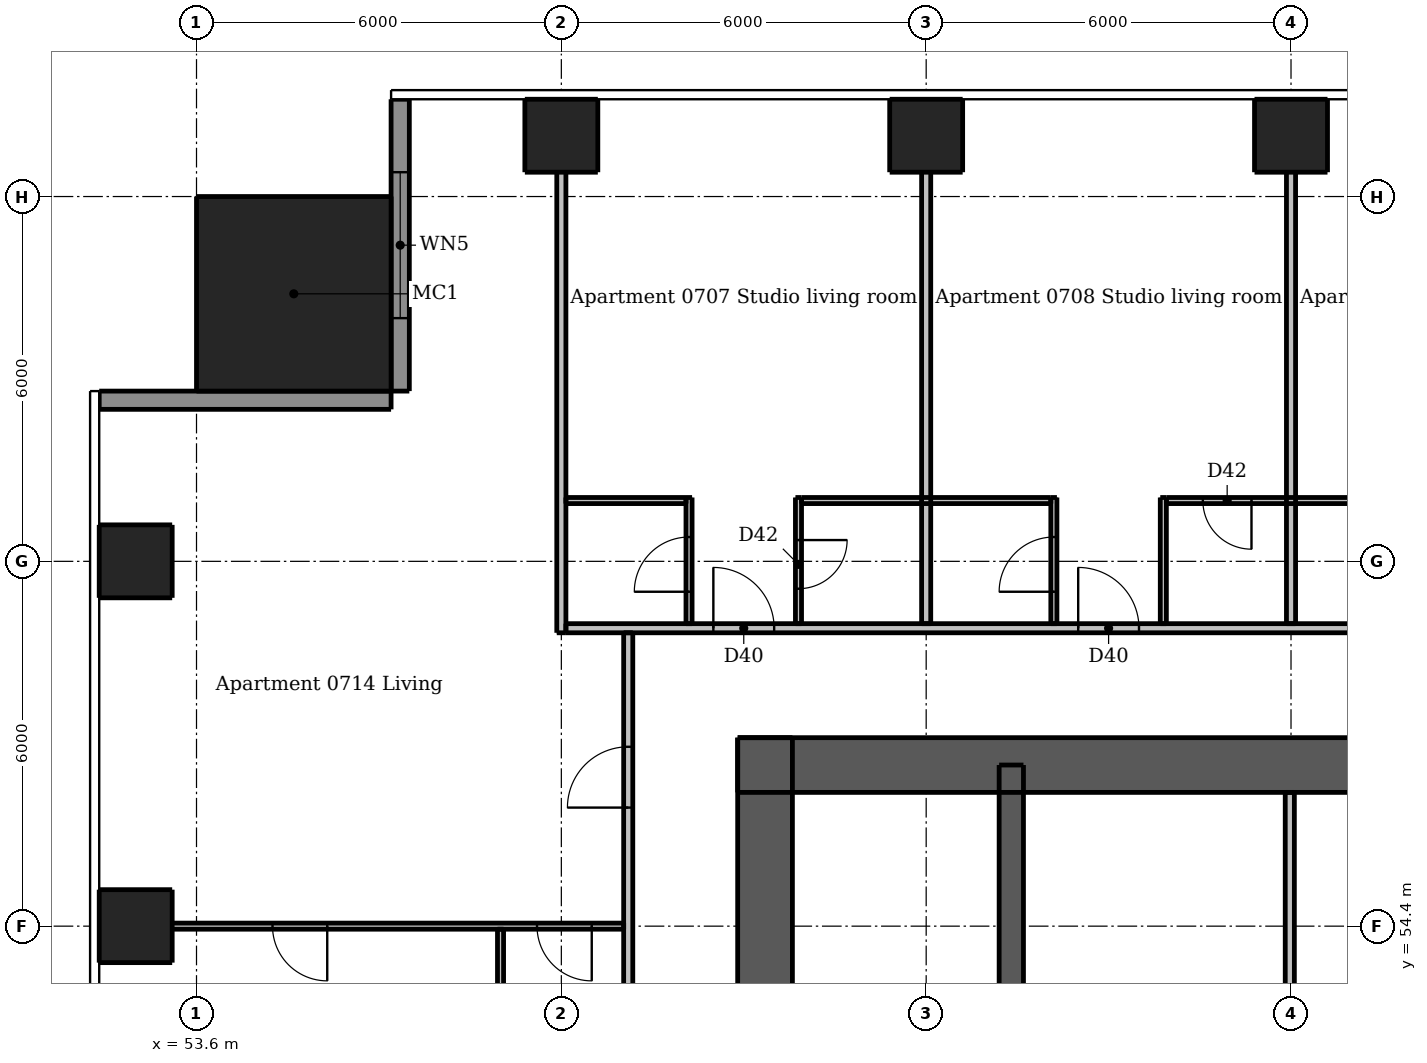
"""IFC4 building model, lengths in metres.
Left out: names, types, materials, properties, quantities, classifications, styles, units other than length and angle.
Written with IfcOpenShell. Run it as: python <this file> out.ifc"""

import sys

from ifc_helpers import new_model, si_unit, direction, frame, frame_2d, origin, origin_2d, place, context, subcontext, project, spatial, rectangle, extrude, element, fill, save


model = new_model("IFC4")
c1 = context("Model", 3, precision=1e-05, world=origin(), true_north=direction((0.0, 1.0)))
c2 = subcontext(c1, "Body", "Model", "MODEL_VIEW")
j1 = project(units=[si_unit("LENGTHUNIT", "METRE"), si_unit("PLANEANGLEUNIT", "RADIAN")], contexts=[c1])
p1 = place(None, origin())
s1 = spatial("IfcSite", under=j1, at=p1, CompositionType="ELEMENT")
p2 = place(p1, origin())
s2 = spatial("IfcBuilding", under=s1, at=p2, CompositionType="ELEMENT")
p3 = place(p2, frame((0.0, 0.0, 30.1)))
s3 = spatial("IfcBuildingStorey", under=s2, at=p3, CompositionType="ELEMENT", Elevation=30.1)
p4 = place(p3, frame((62.5, 57.05, 0.0), z_axis=(0.0, 0.0, 1.0), x_axis=(1.0, 0.0, 0.0)))
e1 = element("IfcWall", 1, at=p4, inside=s3, PredefinedType="SHEAR", context=c2, shape_type="SweptSolid", body=[
    extrude(rectangle(XDim=24.0, YDim=0.9, at=frame_2d((12.0, 0.0))), origin(), (0.0, 0.0, 1.0), 3.05),
])
p5 = place(p4, frame((20.85, 0.0, 0.0)))
e2 = element("IfcOpeningElement", 2, at=p5, cuts=e1, PredefinedType="OPENING", context=c2, shape_type="SweptSolid", body=[
    extrude(rectangle(XDim=1.1, YDim=2.1, at=frame_2d((0.55, 1.05))), frame((0.0, 0.46, 0.0), z_axis=(0.0, -1.0, 0.0), x_axis=(1.0, 0.0, 0.0)), (0.0, 0.0, 1.0), 0.92),
])
p6 = place(p4, frame((2.05, 0.0, 0.0)))
e3 = element("IfcOpeningElement", 3, at=p6, cuts=e1, PredefinedType="OPENING", context=c2, shape_type="SweptSolid", body=[
    extrude(rectangle(XDim=1.1, YDim=2.1, at=frame_2d((0.55, 1.05))), frame((0.0, 0.46, 0.0), z_axis=(0.0, -1.0, 0.0), x_axis=(1.0, 0.0, 0.0)), (0.0, 0.0, 1.0), 0.92),
])
p7 = place(p4, frame((6.44, 0.0, 0.0)))
e4 = element("IfcOpeningElement", 4, at=p7, cuts=e1, PredefinedType="OPENING", context=c2, shape_type="SweptSolid", body=[
    extrude(rectangle(XDim=0.9, YDim=2.1, at=frame_2d((0.45, 1.05))), frame((0.0, 0.46, 0.0), z_axis=(0.0, -1.0, 0.0), x_axis=(1.0, 0.0, 0.0)), (0.0, 0.0, 1.0), 0.92),
])
p8 = place(p4, frame((13.74, 0.0, 0.0)))
e5 = element("IfcOpeningElement", 5, at=p8, cuts=e1, PredefinedType="OPENING", context=c2, shape_type="SweptSolid", body=[
    extrude(rectangle(XDim=0.9, YDim=2.1, at=frame_2d((0.45, 1.05))), frame((0.0, 0.46, 0.0), z_axis=(0.0, -1.0, 0.0), x_axis=(1.0, 0.0, 0.0)), (0.0, 0.0, 1.0), 0.92),
])
p9 = place(p3, frame((62.95, 33.5, 0.0), z_axis=(0.0, 0.0, 1.0), x_axis=(0.0, 1.0, 0.0)))
e6 = element("IfcWall", 6, at=p9, inside=s3, PredefinedType="SHEAR", context=c2, shape_type="SweptSolid", body=[
    extrude(rectangle(XDim=24.0, YDim=0.9, at=frame_2d((12.0, 0.0))), origin(), (0.0, 0.0, 1.0), 3.05),
])
p10 = place(p9, frame((11.2, 0.0, 0.0)))
e7 = element("IfcOpeningElement", 7, at=p10, cuts=e6, PredefinedType="OPENING", context=c2, shape_type="SweptSolid", body=[
    extrude(rectangle(XDim=1.6, YDim=2.1, at=frame_2d((0.8, 1.05))), frame((0.0, 0.46, 0.0), z_axis=(0.0, -1.0, 0.0), x_axis=(1.0, 0.0, 0.0)), (0.0, 0.0, 1.0), 0.92),
])
p11 = place(p3, frame((67.0, 47.1, 0.0), z_axis=(0.0, 0.0, 1.0), x_axis=(0.0, 1.0, 0.0)))
e8 = element("IfcWall", 8, at=p11, inside=s3, PredefinedType="SHEAR", context=c2, shape_type="SweptSolid", body=[
    extrude(rectangle(XDim=9.95, YDim=0.4, at=frame_2d((4.975, 0.0))), origin(), (0.0, 0.0, 1.0), 3.05),
])
for number, where, z_axis, x_axis in (
    (9, (59.6, 67.4, 0.0), (0.0, 0.0, 1.0), (1.0, 0.0, 0.0)),
    (10, (65.6, 67.4, 0.0), (0.0, 0.0, 1.0), (1.0, 0.0, 0.0)),
    (11, (71.6, 67.4, 0.0), (0.0, 0.0, 1.0), (1.0, 0.0, 0.0)),
    (12, (52.6, 54.4, 0.0), (0.0, 0.0, 1.0), (1.0, 0.0, 0.0)),
    (13, (52.6, 60.4, 0.0), (0.0, 0.0, 1.0), (1.0, 0.0, 0.0)),
):
    element("IfcColumn", number, at=place(p3, frame(where, z_axis=z_axis, x_axis=x_axis)), inside=s3, PredefinedType="COLUMN", context=c2, shape_type="SweptSolid", body=[
        extrude(rectangle(XDim=1.2, YDim=1.2, at=origin_2d()), origin(), (0.0, 0.0, 1.0), 3.05),
    ])
p12 = place(p3, frame((55.2, 64.8, 0.0), z_axis=(0.0, 0.0, 1.0), x_axis=(1.0, 0.0, 0.0)))
e14 = element("IfcColumn", 14, at=p12, inside=s3, PredefinedType="COLUMN", context=c2, shape_type="SweptSolid", body=[
    extrude(rectangle(XDim=3.2, YDim=3.2, at=origin_2d()), origin(), (0.0, 0.0, 1.0), 3.3),
])
p13 = place(p3, frame((56.95, 68.0, 0.0), z_axis=(0.0, 0.0, 1.0), x_axis=(0.0, -1.0, 0.0)))
e15 = element("IfcWall", 15, at=p13, inside=s3, PredefinedType="SOLIDWALL", context=c2, shape_type="SweptSolid", body=[
    extrude(rectangle(XDim=4.8, YDim=0.3, at=frame_2d((2.4, 0.0))), origin(), (0.0, 0.0, 1.0), 3.05),
])
p14 = place(p13, frame((1.2, 0.0, 0.15)))
e16 = element("IfcOpeningElement", 16, at=p14, cuts=e15, PredefinedType="OPENING", context=c2, shape_type="SweptSolid", body=[
    extrude(rectangle(XDim=2.4, YDim=2.1, at=frame_2d((1.2, 1.05))), frame((0.0, 0.16, 0.0), z_axis=(0.0, -1.0, 0.0), x_axis=(1.0, 0.0, 0.0)), (0.0, 0.0, 1.0), 0.32),
])
p15 = place(p3, frame((56.8, 63.05, 0.0), z_axis=(0.0, 0.0, 1.0), x_axis=(-1.0, 0.0, 0.0)))
e17 = element("IfcWall", 17, at=p15, inside=s3, PredefinedType="SOLIDWALL", context=c2, shape_type="SweptSolid", body=[
    extrude(rectangle(XDim=4.8, YDim=0.3, at=frame_2d((2.4, 0.0))), origin(), (0.0, 0.0, 1.0), 3.05),
])
p16 = place(p3, frame((71.58, 50.2, 0.0), z_axis=(0.0, 0.0, 1.0), x_axis=(0.0, 1.0, 0.0)))
e18 = element("IfcWall", 18, at=p16, inside=s3, PredefinedType="PLUMBINGWALL", context=c2, shape_type="SweptSolid", body=[
    extrude(rectangle(XDim=6.4, YDim=0.15, at=frame_2d((3.2, 0.0))), origin(), (0.0, 0.0, 1.0), 3.05),
])
p17 = place(p3, frame((58.6, 54.35, 0.0), z_axis=(0.0, 0.0, 1.0), x_axis=(0.0, -1.0, 0.0)))
e19 = element("IfcWall", 19, at=p17, inside=s3, PredefinedType="PARTITIONING", context=c2, shape_type="SweptSolid", body=[
    extrude(rectangle(XDim=8.1, YDim=0.1, at=frame_2d((4.05, 0.0))), origin(), (0.0, 0.0, 1.0), 3.05),
])
p18 = place(p17, frame((3.75, 0.0, 0.0)))
e20 = element("IfcOpeningElement", 20, at=p18, cuts=e19, PredefinedType="OPENING", context=c2, shape_type="SweptSolid", body=[
    extrude(rectangle(XDim=0.8, YDim=2.1, at=frame_2d((0.4, 1.05))), frame((0.0, 0.06, 0.0), z_axis=(0.0, -1.0, 0.0), x_axis=(1.0, 0.0, 0.0)), (0.0, 0.0, 1.0), 0.12),
])
p19 = place(p3, frame((61.7, 59.375, 0.0), z_axis=(0.0, 0.0, 1.0), x_axis=(0.0, 1.0, 0.0)))
e21 = element("IfcWall", 21, at=p19, inside=s3, PredefinedType="PARTITIONING", context=c2, shape_type="SweptSolid", body=[
    extrude(rectangle(XDim=2.075, YDim=0.1, at=frame_2d((1.038, 0.0))), origin(), (0.0, 0.0, 1.0), 3.05),
])
p20 = place(p19, frame((0.525, 0.0, 0.0)))
e22 = element("IfcOpeningElement", 22, at=p20, cuts=e21, PredefinedType="OPENING", context=c2, shape_type="SweptSolid", body=[
    extrude(rectangle(XDim=0.9, YDim=2.1, at=frame_2d((0.45, 1.05))), frame((0.0, 0.06, 0.0), z_axis=(0.0, -1.0, 0.0), x_axis=(1.0, 0.0, 0.0)), (0.0, 0.0, 1.0), 0.12),
])
p21 = place(p3, frame((63.5, 61.45, 0.0), z_axis=(0.0, 0.0, 1.0), x_axis=(0.0, -1.0, 0.0)))
e23 = element("IfcWall", 23, at=p21, inside=s3, PredefinedType="PARTITIONING", context=c2, shape_type="SweptSolid", body=[
    extrude(rectangle(XDim=2.075, YDim=0.1, at=frame_2d((1.038, 0.0))), origin(), (0.0, 0.0, 1.0), 3.05),
])
p22 = place(p21, frame((0.7, 0.0, 0.0)))
e24 = element("IfcOpeningElement", 24, at=p22, cuts=e23, PredefinedType="OPENING", context=c2, shape_type="SweptSolid", body=[
    extrude(rectangle(XDim=0.8, YDim=2.1, at=frame_2d((0.4, 1.05))), frame((0.0, 0.06, 0.0), z_axis=(0.0, -1.0, 0.0), x_axis=(1.0, 0.0, 0.0)), (0.0, 0.0, 1.0), 0.12),
])
p23 = place(p3, frame((67.7, 59.375, 0.0), z_axis=(0.0, 0.0, 1.0), x_axis=(0.0, 1.0, 0.0)))
e25 = element("IfcWall", 25, at=p23, inside=s3, PredefinedType="PARTITIONING", context=c2, shape_type="SweptSolid", body=[
    extrude(rectangle(XDim=2.075, YDim=0.1, at=frame_2d((1.038, 0.0))), origin(), (0.0, 0.0, 1.0), 3.05),
])
p24 = place(p23, frame((0.525, 0.0, 0.0)))
e26 = element("IfcOpeningElement", 26, at=p24, cuts=e25, PredefinedType="OPENING", context=c2, shape_type="SweptSolid", body=[
    extrude(rectangle(XDim=0.9, YDim=2.1, at=frame_2d((0.45, 1.05))), frame((0.0, 0.06, 0.0), z_axis=(0.0, -1.0, 0.0), x_axis=(1.0, 0.0, 0.0)), (0.0, 0.0, 1.0), 0.12),
])
p25 = place(p3, frame((69.5, 59.375, 0.0), z_axis=(0.0, 0.0, 1.0), x_axis=(0.0, 1.0, 0.0)))
e27 = element("IfcWall", 27, at=p25, inside=s3, PredefinedType="PARTITIONING", context=c2, shape_type="SweptSolid", body=[
    extrude(rectangle(XDim=2.075, YDim=0.1, at=frame_2d((1.038, 0.0))), origin(), (0.0, 0.0, 1.0), 3.05),
])
p26 = place(p3, frame((59.675, 61.4, 0.0), z_axis=(0.0, 0.0, 1.0), x_axis=(1.0, 0.0, 0.0)))
e28 = element("IfcWall", 28, at=p26, inside=s3, PredefinedType="PARTITIONING", context=c2, shape_type="SweptSolid", body=[
    extrude(rectangle(XDim=1.975, YDim=0.1, at=frame_2d((0.987, 0.0))), origin(), (0.0, 0.0, 1.0), 3.05),
])
p27 = place(p3, frame((63.55, 61.4, 0.0), z_axis=(0.0, 0.0, 1.0), x_axis=(1.0, 0.0, 0.0)))
e29 = element("IfcWall", 29, at=p27, inside=s3, PredefinedType="PARTITIONING", context=c2, shape_type="SweptSolid", body=[
    extrude(rectangle(XDim=4.1, YDim=0.1, at=frame_2d((2.05, 0.0))), origin(), (0.0, 0.0, 1.0), 3.05),
])
p28 = place(p3, frame((73.65, 61.4, 0.0), z_axis=(0.0, 0.0, 1.0), x_axis=(-1.0, 0.0, 0.0)))
e30 = element("IfcWall", 30, at=p28, inside=s3, PredefinedType="PARTITIONING", context=c2, shape_type="SweptSolid", body=[
    extrude(rectangle(XDim=4.1, YDim=0.1, at=frame_2d((2.05, 0.0))), origin(), (0.0, 0.0, 1.0), 3.05),
])
p29 = place(p28, frame((2.7, 0.0, 0.0)))
e31 = element("IfcOpeningElement", 31, at=p29, cuts=e30, PredefinedType="OPENING", context=c2, shape_type="SweptSolid", body=[
    extrude(rectangle(XDim=0.8, YDim=2.1, at=frame_2d((0.4, 1.05))), frame((0.0, 0.06, 0.0), z_axis=(0.0, -1.0, 0.0), x_axis=(1.0, 0.0, 0.0)), (0.0, 0.0, 1.0), 0.12),
])
p30 = place(p3, frame((60.625, 54.4, 0.0), z_axis=(0.0, 0.0, 1.0), x_axis=(-1.0, 0.0, 0.0)))
e32 = element("IfcWall", 32, at=p30, inside=s3, PredefinedType="PARTITIONING", context=c2, shape_type="SweptSolid", body=[
    extrude(rectangle(XDim=8.625, YDim=0.1, at=frame_2d((4.312, 0.0))), origin(), (0.0, 0.0, 1.0), 2.516),
])
p31 = place(p30, frame((0.525, 0.0, 0.0)))
e33 = element("IfcOpeningElement", 33, at=p31, cuts=e32, PredefinedType="OPENING", context=c2, shape_type="SweptSolid", body=[
    extrude(rectangle(XDim=0.9, YDim=2.1, at=frame_2d((0.45, 1.05))), frame((0.0, 0.06, 0.0), z_axis=(0.0, -1.0, 0.0), x_axis=(1.0, 0.0, 0.0)), (0.0, 0.0, 1.0), 0.12),
])
p32 = place(p30, frame((4.875, 0.0, 0.0)))
e34 = element("IfcOpeningElement", 34, at=p32, cuts=e32, PredefinedType="OPENING", context=c2, shape_type="SweptSolid", body=[
    extrude(rectangle(XDim=0.9, YDim=2.1, at=frame_2d((0.45, 1.05))), frame((0.0, 0.06, 0.0), z_axis=(0.0, -1.0, 0.0), x_axis=(1.0, 0.0, 0.0)), (0.0, 0.0, 1.0), 0.12),
])
p33 = place(p3, frame((59.6, 59.225, 0.0), z_axis=(0.0, 0.0, 1.0), x_axis=(0.0, 1.0, 0.0)))
e35 = element("IfcWall", 35, at=p33, inside=s3, PredefinedType="PARTITIONING", context=c2, shape_type="SweptSolid", body=[
    extrude(rectangle(XDim=8.775, YDim=0.15, at=frame_2d((4.387, 0.0))), origin(), (0.0, 0.0, 1.0), 2.51),
])
p34 = place(p3, frame((60.7, 30.325, 0.0), z_axis=(0.0, 0.0, 1.0), x_axis=(0.0, 1.0, 0.0)))
e36 = element("IfcWall", 36, at=p34, inside=s3, PredefinedType="PARTITIONING", context=c2, shape_type="SweptSolid", body=[
    extrude(rectangle(XDim=28.9, YDim=0.15, at=frame_2d((14.45, 0.0))), origin(), (0.0, 0.0, 1.0), 3.05),
])
p35 = place(p34, frame((2.575, 0.0, 0.0)))
e37 = element("IfcOpeningElement", 37, at=p35, cuts=e36, PredefinedType="OPENING", context=c2, shape_type="SweptSolid", body=[
    extrude(rectangle(XDim=1.0, YDim=2.1, at=frame_2d((0.5, 1.05))), frame((0.0, 0.085, 0.0), z_axis=(0.0, -1.0, 0.0), x_axis=(1.0, 0.0, 0.0)), (0.0, 0.0, 1.0), 0.17),
])
p36 = place(p34, frame((8.575, 0.0, 0.0)))
e38 = element("IfcOpeningElement", 38, at=p36, cuts=e36, PredefinedType="OPENING", context=c2, shape_type="SweptSolid", body=[
    extrude(rectangle(XDim=1.0, YDim=2.1, at=frame_2d((0.5, 1.05))), frame((0.0, 0.085, 0.0), z_axis=(0.0, -1.0, 0.0), x_axis=(1.0, 0.0, 0.0)), (0.0, 0.0, 1.0), 0.17),
])
p37 = place(p34, frame((14.575, 0.0, 0.0)))
e39 = element("IfcOpeningElement", 39, at=p37, cuts=e36, PredefinedType="OPENING", context=c2, shape_type="SweptSolid", body=[
    extrude(rectangle(XDim=1.0, YDim=2.1, at=frame_2d((0.5, 1.05))), frame((0.0, 0.085, 0.0), z_axis=(0.0, -1.0, 0.0), x_axis=(1.0, 0.0, 0.0)), (0.0, 0.0, 1.0), 0.17),
])
p38 = place(p34, frame((26.025, 0.0, 0.0)))
e40 = element("IfcOpeningElement", 40, at=p38, cuts=e36, PredefinedType="OPENING", context=c2, shape_type="SweptSolid", body=[
    extrude(rectangle(XDim=1.0, YDim=2.1, at=frame_2d((0.5, 1.05))), frame((0.0, 0.085, 0.0), z_axis=(0.0, -1.0, 0.0), x_axis=(1.0, 0.0, 0.0)), (0.0, 0.0, 1.0), 0.17),
])
for number, where, z_axis, x_axis in (
    (41, (65.6, 59.375, 0.0), (0.0, 0.0, 1.0), (0.0, 1.0, 0.0)),
    (42, (71.6, 59.375, 0.0), (0.0, 0.0, 1.0), (0.0, 1.0, 0.0)),
):
    element("IfcWall", number, at=place(p3, frame(where, z_axis=z_axis, x_axis=x_axis)), inside=s3, PredefinedType="PARTITIONING", context=c2, shape_type="SweptSolid", body=[
        extrude(rectangle(XDim=8.625, YDim=0.15, at=frame_2d((4.312, 0.0))), origin(), (0.0, 0.0, 1.0), 2.516),
    ])
p39 = place(p3, frame((59.675, 59.3, 0.0), z_axis=(0.0, 0.0, 1.0), x_axis=(1.0, 0.0, 0.0)))
e43 = element("IfcWall", 43, at=p39, inside=s3, PredefinedType="PARTITIONING", context=c2, shape_type="SweptSolid", body=[
    extrude(rectangle(XDim=28.55, YDim=0.15, at=frame_2d((14.275, 0.0))), origin(), (0.0, 0.0, 1.0), 3.05),
])
p40 = place(p39, frame((2.425, 0.0, 0.0)))
e44 = element("IfcOpeningElement", 44, at=p40, cuts=e43, PredefinedType="OPENING", context=c2, shape_type="SweptSolid", body=[
    extrude(rectangle(XDim=1.0, YDim=2.1, at=frame_2d((0.5, 1.05))), frame((0.0, 0.085, 0.0), z_axis=(0.0, -1.0, 0.0), x_axis=(1.0, 0.0, 0.0)), (0.0, 0.0, 1.0), 0.17),
])
p41 = place(p39, frame((8.425, 0.0, 0.0)))
e45 = element("IfcOpeningElement", 45, at=p41, cuts=e43, PredefinedType="OPENING", context=c2, shape_type="SweptSolid", body=[
    extrude(rectangle(XDim=1.0, YDim=2.1, at=frame_2d((0.5, 1.05))), frame((0.0, 0.085, 0.0), z_axis=(0.0, -1.0, 0.0), x_axis=(1.0, 0.0, 0.0)), (0.0, 0.0, 1.0), 0.17),
])
p42 = place(p39, frame((14.425, 0.0, 0.0)))
e46 = element("IfcOpeningElement", 46, at=p42, cuts=e43, PredefinedType="OPENING", context=c2, shape_type="SweptSolid", body=[
    extrude(rectangle(XDim=1.0, YDim=2.1, at=frame_2d((0.5, 1.05))), frame((0.0, 0.085, 0.0), z_axis=(0.0, -1.0, 0.0), x_axis=(1.0, 0.0, 0.0)), (0.0, 0.0, 1.0), 0.17),
])
p43 = place(p39, frame((25.775, 0.0, 0.0)))
e47 = element("IfcOpeningElement", 47, at=p43, cuts=e43, PredefinedType="OPENING", context=c2, shape_type="SweptSolid", body=[
    extrude(rectangle(XDim=1.0, YDim=2.1, at=frame_2d((0.5, 1.05))), frame((0.0, 0.085, 0.0), z_axis=(0.0, -1.0, 0.0), x_axis=(1.0, 0.0, 0.0)), (0.0, 0.0, 1.0), 0.17),
])
p44 = place(p14, origin())
e48 = element("IfcWindow", 48, at=p44, inside=s3, PartitioningType="DOUBLE_PANEL_VERTICAL", PredefinedType="WINDOW", context=c2, shape_type="SweptSolid", body=[
    extrude(rectangle(XDim=2.4, YDim=2.1, at=frame_2d((1.2, 1.05))), frame((0.0, 0.03, 0.0), z_axis=(0.0, -1.0, 0.0), x_axis=(1.0, 0.0, 0.0)), (0.0, 0.0, 1.0), 0.06),
])
fill(e16, e48)
p45 = place(p6, origin())
e49 = element("IfcDoor", 49, at=p45, inside=s3, OperationType="SINGLE_SWING_LEFT", PredefinedType="DOOR", context=c2, shape_type="SweptSolid", body=[
    extrude(rectangle(XDim=1.1, YDim=2.1, at=frame_2d((0.55, 1.05))), frame((0.0, -0.388, 0.0), z_axis=(0.0, -1.0, 0.0), x_axis=(1.0, 0.0, 0.0)), (0.0, 0.0, 1.0), 0.05),
])
fill(e3, e49)
p46 = place(p7, origin())
e50 = element("IfcDoor", 50, at=p46, inside=s3, OperationType="SINGLE_SWING_RIGHT", PredefinedType="DOOR", context=c2, shape_type="SweptSolid", body=[
    extrude(rectangle(XDim=0.9, YDim=2.1, at=frame_2d((0.45, 1.05))), frame((0.0, -0.388, 0.0), z_axis=(0.0, -1.0, 0.0), x_axis=(1.0, 0.0, 0.0)), (0.0, 0.0, 1.0), 0.05),
])
fill(e4, e50)
p47 = place(p40, origin())
e51 = element("IfcDoor", 51, at=p47, inside=s3, OperationType="SINGLE_SWING_LEFT", PredefinedType="DOOR", context=c2, shape_type="SweptSolid", body=[
    extrude(rectangle(XDim=1.0, YDim=2.1, at=frame_2d((0.5, 1.05))), frame((0.0, 0.025, 0.0), z_axis=(0.0, -1.0, 0.0), x_axis=(1.0, 0.0, 0.0)), (0.0, 0.0, 1.0), 0.05),
])
fill(e44, e51)
p48 = place(p20, origin())
e52 = element("IfcDoor", 52, at=p48, inside=s3, OperationType="SINGLE_SWING_LEFT", PredefinedType="DOOR", context=c2, shape_type="SweptSolid", body=[
    extrude(rectangle(XDim=0.9, YDim=2.1, at=frame_2d((0.45, 1.05))), frame((0.0, 0.025, 0.0), z_axis=(0.0, -1.0, 0.0), x_axis=(1.0, 0.0, 0.0)), (0.0, 0.0, 1.0), 0.05),
])
fill(e22, e52)
p49 = place(p22, origin())
e53 = element("IfcDoor", 53, at=p49, inside=s3, OperationType="SINGLE_SWING_LEFT", PredefinedType="DOOR", context=c2, shape_type="SweptSolid", body=[
    extrude(rectangle(XDim=0.8, YDim=2.1, at=frame_2d((0.4, 1.05))), frame((0.0, 0.025, 0.0), z_axis=(0.0, -1.0, 0.0), x_axis=(1.0, 0.0, 0.0)), (0.0, 0.0, 1.0), 0.05),
])
fill(e24, e53)
p50 = place(p41, origin())
e54 = element("IfcDoor", 54, at=p50, inside=s3, OperationType="SINGLE_SWING_LEFT", PredefinedType="DOOR", context=c2, shape_type="SweptSolid", body=[
    extrude(rectangle(XDim=1.0, YDim=2.1, at=frame_2d((0.5, 1.05))), frame((0.0, 0.025, 0.0), z_axis=(0.0, -1.0, 0.0), x_axis=(1.0, 0.0, 0.0)), (0.0, 0.0, 1.0), 0.05),
])
fill(e45, e54)
p51 = place(p24, origin())
e55 = element("IfcDoor", 55, at=p51, inside=s3, OperationType="SINGLE_SWING_LEFT", PredefinedType="DOOR", context=c2, shape_type="SweptSolid", body=[
    extrude(rectangle(XDim=0.9, YDim=2.1, at=frame_2d((0.45, 1.05))), frame((0.0, 0.025, 0.0), z_axis=(0.0, -1.0, 0.0), x_axis=(1.0, 0.0, 0.0)), (0.0, 0.0, 1.0), 0.05),
])
fill(e26, e55)
p52 = place(p29, origin())
e56 = element("IfcDoor", 56, at=p52, inside=s3, OperationType="SINGLE_SWING_LEFT", PredefinedType="DOOR", context=c2, shape_type="SweptSolid", body=[
    extrude(rectangle(XDim=0.8, YDim=2.1, at=frame_2d((0.4, 1.05))), frame((0.0, 0.025, 0.0), z_axis=(0.0, -1.0, 0.0), x_axis=(1.0, 0.0, 0.0)), (0.0, 0.0, 1.0), 0.05),
])
fill(e31, e56)
p53 = place(p38, origin())
e57 = element("IfcDoor", 57, at=p53, inside=s3, OperationType="SINGLE_SWING_LEFT", PredefinedType="DOOR", context=c2, shape_type="SweptSolid", body=[
    extrude(rectangle(XDim=1.0, YDim=2.1, at=frame_2d((0.5, 1.05))), frame((0.0, 0.025, 0.0), z_axis=(0.0, -1.0, 0.0), x_axis=(1.0, 0.0, 0.0)), (0.0, 0.0, 1.0), 0.05),
])
fill(e40, e57)
p54 = place(p31, origin())
e58 = element("IfcDoor", 58, at=p54, inside=s3, OperationType="SINGLE_SWING_LEFT", PredefinedType="DOOR", context=c2, shape_type="SweptSolid", body=[
    extrude(rectangle(XDim=0.9, YDim=2.1, at=frame_2d((0.45, 1.05))), frame((0.0, 0.025, 0.0), z_axis=(0.0, -1.0, 0.0), x_axis=(1.0, 0.0, 0.0)), (0.0, 0.0, 1.0), 0.05),
])
fill(e33, e58)
p55 = place(p32, origin())
e59 = element("IfcDoor", 59, at=p55, inside=s3, OperationType="SINGLE_SWING_LEFT", PredefinedType="DOOR", context=c2, shape_type="SweptSolid", body=[
    extrude(rectangle(XDim=0.9, YDim=2.1, at=frame_2d((0.45, 1.05))), frame((0.0, 0.025, 0.0), z_axis=(0.0, -1.0, 0.0), x_axis=(1.0, 0.0, 0.0)), (0.0, 0.0, 1.0), 0.05),
])
fill(e34, e59)
save(model, sys.argv[1])
